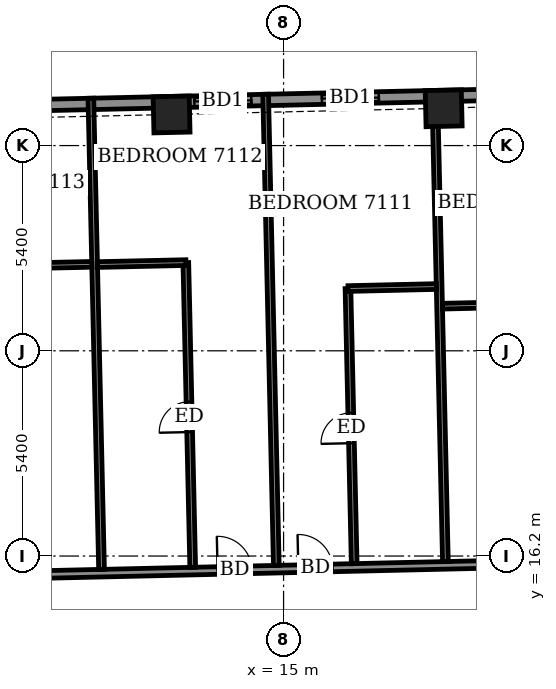
"""IFC4 building model, lengths in metres.
Left out: names, types, materials, properties, quantities, classifications, styles, units other than length and angle.
Written with IfcOpenShell. Run it as: python <this file> out.ifc"""

import sys

from ifc_helpers import new_model, si_unit, direction, frame, frame_2d, origin, origin_2d, place, context, subcontext, project, spatial, rectangle, extrude, element, fill, save


model = new_model("IFC4")
c1 = context("Model", 3, precision=1e-05, world=origin(), true_north=direction((0.0, 1.0)))
c2 = subcontext(c1, "Body", "Model", "MODEL_VIEW")
j1 = project(units=[si_unit("LENGTHUNIT", "METRE"), si_unit("PLANEANGLEUNIT", "RADIAN")], contexts=[c1])
p1 = place(None, origin())
s1 = spatial("IfcSite", under=j1, at=p1, CompositionType="ELEMENT")
p2 = place(p1, origin())
s2 = spatial("IfcBuilding", under=s1, at=p2, CompositionType="ELEMENT")
p3 = place(p2, frame((0.0, 0.0, 279.9)))
s3 = spatial("IfcBuildingStorey", under=s2, at=p3, CompositionType="ELEMENT", Elevation=279.9)
for number, where, z_axis, x_axis in (
    (1, (19.213, 27.981, -0.55), (0.0, 0.0, 1.0), (-1.0, -0.023, 0.0)),
    (2, (12.053, 27.819, -0.55), (0.0, 0.0, 1.0), (-1.0, -0.023, 0.0)),
):
    element("IfcColumn", number, at=place(p3, frame(where, z_axis=z_axis, x_axis=x_axis)), inside=s3, PredefinedType="COLUMN", context=c2, shape_type="SweptSolid", body=[
        extrude(rectangle(XDim=0.95, YDim=0.95, at=origin_2d()), origin(), (0.0, 0.0, 1.0), 3.6),
    ])
p4 = place(p3, frame((26.216, 28.465, 0.0), z_axis=(0.0, 0.0, 1.0), x_axis=(-0.999742843677, -0.022677004157, 0.0)))
e3 = element("IfcWall", 3, at=p4, inside=s3, PredefinedType="SOLIDWALL", context=c2, shape_type="SweptSolid", body=[
    extrude(rectangle(XDim=49.836, YDim=0.3, at=frame_2d((24.918, 0.0))), origin(), (0.0, 0.0, 1.0), 2.5),
])
p5 = place(p4, frame((0.938, 0.0, 0.0)))
e4 = element("IfcOpeningElement", 4, at=p5, cuts=e3, PredefinedType="OPENING", context=c2, shape_type="SweptSolid", body=[
    extrude(rectangle(XDim=1.5, YDim=2.4, at=frame_2d((0.75, 1.2))), frame((0.0, 0.16, 0.0), z_axis=(0.0, -1.0, 0.0), x_axis=(1.0, 0.0, 0.0)), (0.0, 0.0, 1.0), 0.32),
])
p6 = place(p4, frame((4.087, 0.0, 0.0)))
e5 = element("IfcOpeningElement", 5, at=p6, cuts=e3, PredefinedType="OPENING", context=c2, shape_type="SweptSolid", body=[
    extrude(rectangle(XDim=1.5, YDim=2.4, at=frame_2d((0.75, 1.2))), frame((0.0, 0.16, 0.0), z_axis=(0.0, -1.0, 0.0), x_axis=(1.0, 0.0, 0.0)), (0.0, 0.0, 1.0), 0.32),
])
p7 = place(p4, frame((8.711, 0.0, 0.0)))
e6 = element("IfcOpeningElement", 6, at=p7, cuts=e3, PredefinedType="OPENING", context=c2, shape_type="SweptSolid", body=[
    extrude(rectangle(XDim=1.5, YDim=2.4, at=frame_2d((0.75, 1.2))), frame((0.0, 0.16, 0.0), z_axis=(0.0, -1.0, 0.0), x_axis=(1.0, 0.0, 0.0)), (0.0, 0.0, 1.0), 0.32),
])
p8 = place(p4, frame((12.067, 0.0, 0.0)))
e7 = element("IfcOpeningElement", 7, at=p8, cuts=e3, PredefinedType="OPENING", context=c2, shape_type="SweptSolid", body=[
    extrude(rectangle(XDim=1.5, YDim=2.4, at=frame_2d((0.75, 1.2))), frame((0.0, 0.16, 0.0), z_axis=(0.0, -1.0, 0.0), x_axis=(1.0, 0.0, 0.0)), (0.0, 0.0, 1.0), 0.32),
])
p9 = place(p4, frame((17.836, 0.0, 0.0)))
e8 = element("IfcOpeningElement", 8, at=p9, cuts=e3, PredefinedType="OPENING", context=c2, shape_type="SweptSolid", body=[
    extrude(rectangle(XDim=1.5, YDim=2.4, at=frame_2d((0.75, 1.2))), frame((0.0, 0.16, 0.0), z_axis=(0.0, -1.0, 0.0), x_axis=(1.0, 0.0, 0.0)), (0.0, 0.0, 1.0), 0.32),
])
p10 = place(p4, frame((22.849, 0.0, 0.0)))
e9 = element("IfcOpeningElement", 9, at=p10, cuts=e3, PredefinedType="OPENING", context=c2, shape_type="SweptSolid", body=[
    extrude(rectangle(XDim=1.5, YDim=2.4, at=frame_2d((0.75, 1.2))), frame((0.0, 0.16, 0.0), z_axis=(0.0, -1.0, 0.0), x_axis=(1.0, 0.0, 0.0)), (0.0, 0.0, 1.0), 0.32),
])
p11 = place(p4, frame((26.205, 0.0, 0.0)))
e10 = element("IfcOpeningElement", 10, at=p11, cuts=e3, PredefinedType="OPENING", context=c2, shape_type="SweptSolid", body=[
    extrude(rectangle(XDim=1.5, YDim=2.4, at=frame_2d((0.75, 1.2))), frame((0.0, 0.16, 0.0), z_axis=(0.0, -1.0, 0.0), x_axis=(1.0, 0.0, 0.0)), (0.0, 0.0, 1.0), 0.32),
])
p12 = place(p4, frame((32.011, 0.0, 0.0)))
e11 = element("IfcOpeningElement", 11, at=p12, cuts=e3, PredefinedType="OPENING", context=c2, shape_type="SweptSolid", body=[
    extrude(rectangle(XDim=1.5, YDim=2.4, at=frame_2d((0.75, 1.2))), frame((0.0, 0.16, 0.0), z_axis=(0.0, -1.0, 0.0), x_axis=(1.0, 0.0, 0.0)), (0.0, 0.0, 1.0), 0.32),
])
p13 = place(p4, frame((37.011, 0.0, 0.0)))
e12 = element("IfcOpeningElement", 12, at=p13, cuts=e3, PredefinedType="OPENING", context=c2, shape_type="SweptSolid", body=[
    extrude(rectangle(XDim=1.5, YDim=2.4, at=frame_2d((0.75, 1.2))), frame((0.0, 0.16, 0.0), z_axis=(0.0, -1.0, 0.0), x_axis=(1.0, 0.0, 0.0)), (0.0, 0.0, 1.0), 0.32),
])
p14 = place(p4, frame((40.367, 0.0, 0.0)))
e13 = element("IfcOpeningElement", 13, at=p14, cuts=e3, PredefinedType="OPENING", context=c2, shape_type="SweptSolid", body=[
    extrude(rectangle(XDim=1.5, YDim=2.4, at=frame_2d((0.75, 1.2))), frame((0.0, 0.16, 0.0), z_axis=(0.0, -1.0, 0.0), x_axis=(1.0, 0.0, 0.0)), (0.0, 0.0, 1.0), 0.32),
])
p15 = place(p4, frame((45.499, 0.0, 0.9)))
e14 = element("IfcOpeningElement", 14, at=p15, cuts=e3, PredefinedType="OPENING", context=c2, shape_type="SweptSolid", body=[
    extrude(rectangle(XDim=2.4, YDim=1.5, at=frame_2d((1.2, 0.75))), frame((0.0, 0.16, 0.0), z_axis=(0.0, -1.0, 0.0), x_axis=(1.0, 0.0, 0.0)), (0.0, 0.0, 1.0), 0.32),
])
p16 = place(p3, frame((-26.401, 14.918, 0.0), z_axis=(0.0, 0.0, 1.0), x_axis=(0.99974239733, 0.022696673341, 0.0)))
e15 = element("IfcWall", 15, at=p16, inside=s3, PredefinedType="PARTITIONING", context=c2, shape_type="SweptSolid", body=[
    extrude(rectangle(XDim=55.386, YDim=0.2, at=frame_2d((27.693, 0.0))), origin(), (0.0, 0.0, 1.0), 3.05),
])
p17 = place(p16, frame((52.889, 0.0, 0.0)))
e16 = element("IfcOpeningElement", 16, at=p17, cuts=e15, PredefinedType="OPENING", context=c2, shape_type="SweptSolid", body=[
    extrude(rectangle(XDim=1.0, YDim=2.1, at=frame_2d((0.5, 1.05))), frame((0.0, 0.11, 0.0), z_axis=(0.0, -1.0, 0.0), x_axis=(1.0, 0.0, 0.0)), (0.0, 0.0, 1.0), 0.22),
])
p18 = place(p16, frame((48.6, 0.0, 0.0)))
e17 = element("IfcOpeningElement", 17, at=p18, cuts=e15, PredefinedType="OPENING", context=c2, shape_type="SweptSolid", body=[
    extrude(rectangle(XDim=0.9, YDim=2.1, at=frame_2d((0.45, 1.05))), frame((0.0, 0.11, 0.0), z_axis=(0.0, -1.0, 0.0), x_axis=(1.0, 0.0, 0.0)), (0.0, 0.0, 1.0), 0.22),
])
p19 = place(p16, frame((41.8, 0.0, 0.0)))
e18 = element("IfcOpeningElement", 18, at=p19, cuts=e15, PredefinedType="OPENING", context=c2, shape_type="SweptSolid", body=[
    extrude(rectangle(XDim=0.9, YDim=2.1, at=frame_2d((0.45, 1.05))), frame((0.0, 0.11, 0.0), z_axis=(0.0, -1.0, 0.0), x_axis=(1.0, 0.0, 0.0)), (0.0, 0.0, 1.0), 0.22),
])
p20 = place(p16, frame((39.675, 0.0, 0.0)))
e19 = element("IfcOpeningElement", 19, at=p20, cuts=e15, PredefinedType="OPENING", context=c2, shape_type="SweptSolid", body=[
    extrude(rectangle(XDim=0.9, YDim=2.1, at=frame_2d((0.45, 1.05))), frame((0.0, 0.11, 0.0), z_axis=(0.0, -1.0, 0.0), x_axis=(1.0, 0.0, 0.0)), (0.0, 0.0, 1.0), 0.22),
])
p21 = place(p16, frame((32.675, 0.0, 0.0)))
e20 = element("IfcOpeningElement", 20, at=p21, cuts=e15, PredefinedType="OPENING", context=c2, shape_type="SweptSolid", body=[
    extrude(rectangle(XDim=0.9, YDim=2.1, at=frame_2d((0.45, 1.05))), frame((0.0, 0.11, 0.0), z_axis=(0.0, -1.0, 0.0), x_axis=(1.0, 0.0, 0.0)), (0.0, 0.0, 1.0), 0.22),
])
p22 = place(p16, frame((30.4, 0.0, 0.0)))
e21 = element("IfcOpeningElement", 21, at=p22, cuts=e15, PredefinedType="OPENING", context=c2, shape_type="SweptSolid", body=[
    extrude(rectangle(XDim=0.9, YDim=2.1, at=frame_2d((0.45, 1.05))), frame((0.0, 0.11, 0.0), z_axis=(0.0, -1.0, 0.0), x_axis=(1.0, 0.0, 0.0)), (0.0, 0.0, 1.0), 0.22),
])
p23 = place(p16, frame((23.225, 0.0, 0.0)))
e22 = element("IfcOpeningElement", 22, at=p23, cuts=e15, PredefinedType="OPENING", context=c2, shape_type="SweptSolid", body=[
    extrude(rectangle(XDim=0.9, YDim=2.1, at=frame_2d((0.45, 1.05))), frame((0.0, 0.11, 0.0), z_axis=(0.0, -1.0, 0.0), x_axis=(1.0, 0.0, 0.0)), (0.0, 0.0, 1.0), 0.22),
])
p24 = place(p16, frame((20.9, 0.0, 0.0)))
e23 = element("IfcOpeningElement", 23, at=p24, cuts=e15, PredefinedType="OPENING", context=c2, shape_type="SweptSolid", body=[
    extrude(rectangle(XDim=0.9, YDim=2.1, at=frame_2d((0.45, 1.05))), frame((0.0, 0.11, 0.0), z_axis=(0.0, -1.0, 0.0), x_axis=(1.0, 0.0, 0.0)), (0.0, 0.0, 1.0), 0.22),
])
p25 = place(p16, frame((13.9, 0.0, 0.0)))
e24 = element("IfcOpeningElement", 24, at=p25, cuts=e15, PredefinedType="OPENING", context=c2, shape_type="SweptSolid", body=[
    extrude(rectangle(XDim=0.9, YDim=2.1, at=frame_2d((0.45, 1.05))), frame((0.0, 0.11, 0.0), z_axis=(0.0, -1.0, 0.0), x_axis=(1.0, 0.0, 0.0)), (0.0, 0.0, 1.0), 0.22),
])
p26 = place(p16, frame((11.775, 0.0, 0.0)))
e25 = element("IfcOpeningElement", 25, at=p26, cuts=e15, PredefinedType="OPENING", context=c2, shape_type="SweptSolid", body=[
    extrude(rectangle(XDim=0.9, YDim=2.1, at=frame_2d((0.45, 1.05))), frame((0.0, 0.11, 0.0), z_axis=(0.0, -1.0, 0.0), x_axis=(1.0, 0.0, 0.0)), (0.0, 0.0, 1.0), 0.22),
])
p27 = place(p16, frame((1.65, 0.0, 0.0)))
e26 = element("IfcOpeningElement", 26, at=p27, cuts=e15, PredefinedType="OPENING", context=c2, shape_type="SweptSolid", body=[
    extrude(rectangle(XDim=1.0, YDim=2.1, at=frame_2d((0.5, 1.05))), frame((0.0, 0.11, 0.0), z_axis=(0.0, -1.0, 0.0), x_axis=(1.0, 0.0, 0.0)), (0.0, 0.0, 1.0), 0.22),
])
p28 = place(p16, frame((7.025, 0.0, 0.0)))
e27 = element("IfcOpeningElement", 27, at=p28, cuts=e15, PredefinedType="OPENING", context=c2, shape_type="SweptSolid", body=[
    extrude(rectangle(XDim=0.9, YDim=2.1, at=frame_2d((0.45, 1.05))), frame((0.0, 0.11, 0.0), z_axis=(0.0, -1.0, 0.0), x_axis=(1.0, 0.0, 0.0)), (0.0, 0.0, 1.0), 0.22),
])
p29 = place(p3, frame((10.21, 15.849, 0.0), z_axis=(0.0, 0.0, 1.0), x_axis=(-0.022661475803, 0.999743195783, 0.0)))
e28 = element("IfcWall", 28, at=p29, inside=s3, PredefinedType="PARTITIONING", context=c2, shape_type="SweptSolid", body=[
    extrude(rectangle(XDim=12.4, YDim=0.15, at=frame_2d((6.2, 0.0))), origin(), (0.0, 0.0, 1.0), 2.5),
])
p30 = place(p3, frame((12.609, 15.903, 0.0), z_axis=(0.0, 0.0, 1.0), x_axis=(-0.022557518047, 0.999745546817, 0.0)))
e29 = element("IfcWall", 29, at=p30, inside=s3, PredefinedType="PARTITIONING", context=c2, shape_type="SweptSolid", body=[
    extrude(rectangle(XDim=8.02, YDim=0.15, at=frame_2d((4.01, 0.0))), origin(), (0.0, 0.0, 1.0), 3.05),
])
p31 = place(p30, frame((3.56, 0.0, 0.0)))
e30 = element("IfcOpeningElement", 30, at=p31, cuts=e29, PredefinedType="OPENING", context=c2, shape_type="SweptSolid", body=[
    extrude(rectangle(XDim=0.8, YDim=2.1, at=frame_2d((0.4, 1.05))), frame((0.0, 0.085, 0.0), z_axis=(0.0, -1.0, 0.0), x_axis=(1.0, 0.0, 0.0)), (0.0, 0.0, 1.0), 0.17),
])
p32 = place(p3, frame((14.809, 15.953, 0.0), z_axis=(0.0, 0.0, 1.0), x_axis=(-0.022661029756, 0.999743205894, 0.0)))
e31 = element("IfcWall", 31, at=p32, inside=s3, PredefinedType="PARTITIONING", context=c2, shape_type="SweptSolid", body=[
    extrude(rectangle(XDim=12.4, YDim=0.15, at=frame_2d((6.2, 0.0))), origin(), (0.0, 0.0, 1.0), 2.5),
])
p33 = place(p3, frame((16.858, 16.0, 0.0), z_axis=(0.0, 0.0, 1.0), x_axis=(-0.022627186748, 0.999743972435, 0.0)))
e32 = element("IfcWall", 32, at=p33, inside=s3, PredefinedType="PARTITIONING", context=c2, shape_type="SweptSolid", body=[
    extrude(rectangle(XDim=7.24, YDim=0.15, at=frame_2d((3.62, 0.0))), origin(), (0.0, 0.0, 1.0), 3.05),
])
p34 = place(p33, frame((3.17, 0.0, 0.0)))
e33 = element("IfcOpeningElement", 33, at=p34, cuts=e32, PredefinedType="OPENING", context=c2, shape_type="SweptSolid", body=[
    extrude(rectangle(XDim=0.8, YDim=2.1, at=frame_2d((0.4, 1.05))), frame((0.0, 0.085, 0.0), z_axis=(0.0, -1.0, 0.0), x_axis=(1.0, 0.0, 0.0)), (0.0, 0.0, 1.0), 0.17),
])
p35 = place(p3, frame((19.258, 16.054, 0.0), z_axis=(0.0, 0.0, 1.0), x_axis=(-0.022740189192, 0.999741408463, 0.0)))
e34 = element("IfcWall", 34, at=p35, inside=s3, PredefinedType="PARTITIONING", context=c2, shape_type="SweptSolid", body=[
    extrude(rectangle(XDim=12.4, YDim=0.15, at=frame_2d((6.2, 0.0))), origin(), (0.0, 0.0, 1.0), 3.05),
])
p36 = place(p3, frame((19.182, 22.774, 0.0), z_axis=(0.0, 0.0, 1.0), x_axis=(0.99974053329, 0.022778632478, 0.0)))
e35 = element("IfcWall", 35, at=p36, inside=s3, PredefinedType="PARTITIONING", context=c2, shape_type="SweptSolid", body=[
    extrude(rectangle(XDim=2.326, YDim=0.15, at=frame_2d((1.163, 0.0))), origin(), (0.0, 0.0, 1.0), 3.05),
])
for number, where, z_axis, x_axis in (
    (36, (16.696, 23.238, 0.0), (0.0, 0.0, 1.0), (1.0, 0.023, 0.0)),
    (37, (10.105, 23.869, 0.0), (0.0, 0.0, 1.0), (1.0, 0.022, 0.0)),
):
    element("IfcWall", number, at=place(p3, frame(where, z_axis=z_axis, x_axis=x_axis)), inside=s3, PredefinedType="PARTITIONING", context=c2, shape_type="SweptSolid", body=[
        extrude(rectangle(XDim=2.325, YDim=0.15, at=frame_2d((1.163, 0.0))), origin(), (0.0, 0.0, 1.0), 3.05),
    ])
p37 = place(p3, frame((7.631, 23.823, 0.0), z_axis=(0.0, 0.0, 1.0), x_axis=(0.999749744571, 0.022370700241, 0.0)))
e38 = element("IfcWall", 38, at=p37, inside=s3, PredefinedType="PARTITIONING", context=c2, shape_type="SweptSolid", body=[
    extrude(rectangle(XDim=2.324, YDim=0.15, at=frame_2d((1.162, 0.0))), origin(), (0.0, 0.0, 1.0), 3.05),
])
p38 = place(p7, origin())
e39 = element("IfcDoor", 39, at=p38, inside=s3, OperationType="SLIDING_TO_LEFT", PredefinedType="DOOR", context=c2, shape_type="SweptSolid", body=[
    extrude(rectangle(XDim=1.5, YDim=2.4, at=frame_2d((0.75, 1.2))), frame((0.0, 0.025, 0.0), z_axis=(0.0, -1.0, 0.0), x_axis=(1.0, 0.0, 0.0)), (0.0, 0.0, 1.0), 0.05),
])
fill(e6, e39)
p39 = place(p8, origin())
e40 = element("IfcDoor", 40, at=p39, inside=s3, OperationType="SLIDING_TO_LEFT", PredefinedType="DOOR", context=c2, shape_type="SweptSolid", body=[
    extrude(rectangle(XDim=1.5, YDim=2.4, at=frame_2d((0.75, 1.2))), frame((0.0, 0.025, 0.0), z_axis=(0.0, -1.0, 0.0), x_axis=(1.0, 0.0, 0.0)), (0.0, 0.0, 1.0), 0.05),
])
fill(e7, e40)
p40 = place(p19, origin())
e41 = element("IfcDoor", 41, at=p40, inside=s3, OperationType="SINGLE_SWING_LEFT", PredefinedType="DOOR", context=c2, shape_type="SweptSolid", body=[
    extrude(rectangle(XDim=0.9, YDim=2.1, at=frame_2d((0.45, 1.05))), frame((0.0, 0.025, 0.0), z_axis=(0.0, -1.0, 0.0), x_axis=(1.0, 0.0, 0.0)), (0.0, 0.0, 1.0), 0.05),
])
fill(e18, e41)
p41 = place(p34, origin())
e42 = element("IfcDoor", 42, at=p41, inside=s3, OperationType="SINGLE_SWING_LEFT", PredefinedType="DOOR", context=c2, shape_type="SweptSolid", body=[
    extrude(rectangle(XDim=0.8, YDim=2.1, at=frame_2d((0.4, 1.05))), frame((0.0, 0.025, 0.0), z_axis=(0.0, -1.0, 0.0), x_axis=(1.0, 0.0, 0.0)), (0.0, 0.0, 1.0), 0.05),
])
fill(e33, e42)
p42 = place(p20, origin())
e43 = element("IfcDoor", 43, at=p42, inside=s3, OperationType="SINGLE_SWING_RIGHT", PredefinedType="DOOR", context=c2, shape_type="SweptSolid", body=[
    extrude(rectangle(XDim=0.9, YDim=2.1, at=frame_2d((0.45, 1.05))), frame((0.0, 0.025, 0.0), z_axis=(0.0, -1.0, 0.0), x_axis=(1.0, 0.0, 0.0)), (0.0, 0.0, 1.0), 0.05),
])
fill(e19, e43)
p43 = place(p31, origin())
e44 = element("IfcDoor", 44, at=p43, inside=s3, OperationType="SINGLE_SWING_RIGHT", PredefinedType="DOOR", context=c2, shape_type="SweptSolid", body=[
    extrude(rectangle(XDim=0.8, YDim=2.1, at=frame_2d((0.4, 1.05))), frame((0.0, 0.025, 0.0), z_axis=(0.0, -1.0, 0.0), x_axis=(1.0, 0.0, 0.0)), (0.0, 0.0, 1.0), 0.05),
])
fill(e30, e44)
save(model, sys.argv[1])
